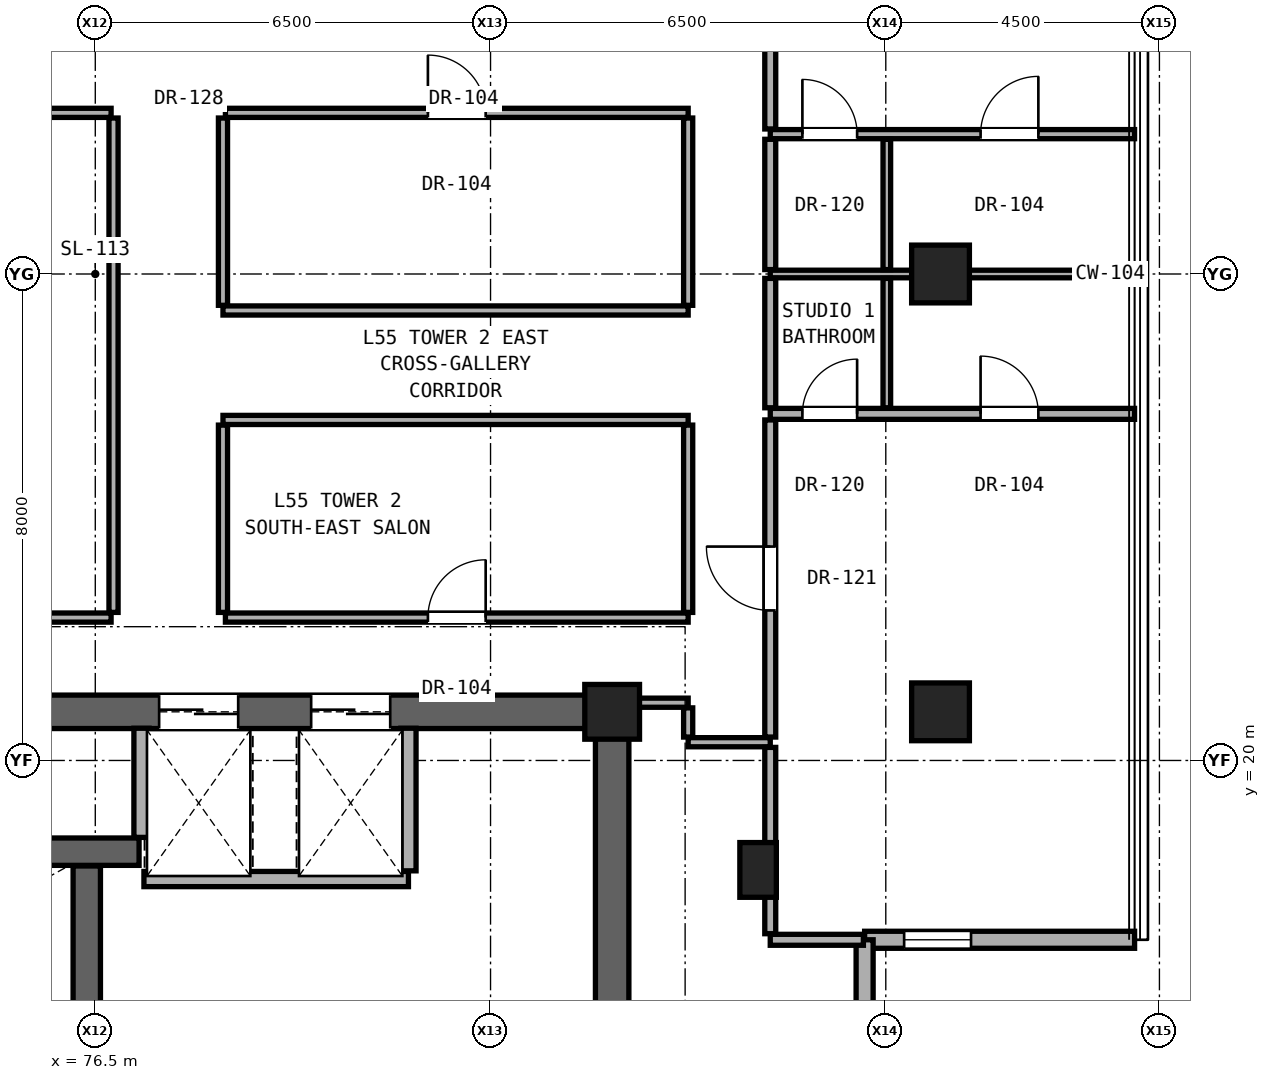
"""IFC4 building model, lengths in metres.
Left out: names, types, materials, properties, quantities, classifications, styles, units other than length and angle.
Written with IfcOpenShell. Run it as: python <this file> out.ifc"""

import sys

from ifc_helpers import new_model, si_unit, direction, frame, frame_2d, origin, origin_2d, place, context, subcontext, project, spatial, rectangle, hollow_rectangle, extrude, element, fill, save


model = new_model("IFC4")
c1 = context("Model", 3, precision=1e-05, world=origin(), true_north=direction((0.0, 1.0)))
c2 = subcontext(c1, "Body", "Model", "MODEL_VIEW")
j1 = project(units=[si_unit("LENGTHUNIT", "METRE"), si_unit("PLANEANGLEUNIT", "RADIAN")], contexts=[c1])
p1 = place(None, origin())
s1 = spatial("IfcSite", under=j1, at=p1, CompositionType="ELEMENT")
p2 = place(p1, origin())
s2 = spatial("IfcBuilding", under=s1, at=p2, CompositionType="ELEMENT")
p3 = place(p2, frame((0.0, 0.0, 193.4)))
s3 = spatial("IfcBuildingStorey", under=s2, at=p3, CompositionType="ELEMENT", Elevation=193.4)
p4 = place(p3, frame((85.0, 20.8, 0.0), z_axis=(0.0, 0.0, 1.0), x_axis=(1.0, 0.0, 0.0)))
e1 = element("IfcColumn", 1, at=p4, inside=s3, PredefinedType="COLUMN", context=c2, shape_type="SweptSolid", body=[
    extrude(rectangle(XDim=0.9, YDim=0.9, at=origin_2d()), origin(), (0.0, 0.0, 1.0), 3.25),
])
for number, where, z_axis, x_axis in (
    (2, (90.4, 20.8, 0.0), (0.0, 0.0, 1.0), (1.0, 0.0, 0.0)),
    (3, (90.4, 28.0, 0.0), (0.0, 0.0, 1.0), (1.0, 0.0, 0.0)),
):
    element("IfcColumn", number, at=place(p3, frame(where, z_axis=z_axis, x_axis=x_axis)), inside=s3, PredefinedType="COLUMN", context=c2, shape_type="SweptSolid", body=[
        extrude(hollow_rectangle(XDim=0.95, YDim=0.95, WallThickness=0.05, at=origin_2d()), origin(), (0.0, 0.0, 1.0), 3.25),
    ])
p5 = place(p3, frame((87.4, 18.2, 0.0), z_axis=(0.0, 0.0, 1.0), x_axis=(1.0, 0.0, 0.0)))
e4 = element("IfcColumn", 4, at=p5, inside=s3, PredefinedType="PILASTER", context=c2, shape_type="SweptSolid", body=[
    extrude(rectangle(XDim=0.6, YDim=0.9, at=origin_2d()), origin(), (0.0, 0.0, 1.0), 3.25),
])
p6 = place(p3, frame((85.0, 15.2, 0.0), z_axis=(0.0, 0.0, 1.0), x_axis=(0.0, 1.0, 0.0)))
e5 = element("IfcWall", 5, at=p6, inside=s3, PredefinedType="SHEAR", context=c2, shape_type="SweptSolid", body=[
    extrude(rectangle(XDim=5.6, YDim=0.55, at=frame_2d((2.8, 0.0))), origin(), (0.0, 0.0, 1.0), 3.05),
])
p7 = place(p3, frame((68.0, 20.8, 0.0), z_axis=(0.0, 0.0, 1.0), x_axis=(1.0, 0.0, 0.0)))
e6 = element("IfcWall", 6, at=p7, inside=s3, PredefinedType="SHEAR", context=c2, shape_type="SweptSolid", body=[
    extrude(rectangle(XDim=17.0, YDim=0.55, at=frame_2d((8.5, 0.0))), origin(), (0.0, 0.0, 1.0), 3.05),
])
p8 = place(p7, frame((9.55, 0.0, 0.0)))
e7 = element("IfcOpeningElement", 7, at=p8, cuts=e6, PredefinedType="OPENING", context=c2, shape_type="SweptSolid", body=[
    extrude(rectangle(XDim=1.3, YDim=2.3, at=frame_2d((0.65, 1.15))), frame((0.0, 0.285, 0.0), z_axis=(0.0, -1.0, 0.0), x_axis=(1.0, 0.0, 0.0)), (0.0, 0.0, 1.0), 0.57),
])
p9 = place(p7, frame((12.05, 0.0, 0.0)))
e8 = element("IfcOpeningElement", 8, at=p9, cuts=e6, PredefinedType="OPENING", context=c2, shape_type="SweptSolid", body=[
    extrude(rectangle(XDim=1.3, YDim=2.3, at=frame_2d((0.65, 1.15))), frame((0.0, 0.285, 0.0), z_axis=(0.0, -1.0, 0.0), x_axis=(1.0, 0.0, 0.0)), (0.0, 0.0, 1.0), 0.57),
])
p10 = place(p3, frame((89.152, 17.051, 0.0), z_axis=(0.0, 0.0, 1.0), x_axis=(1.0, 0.0, 0.0)))
e9 = element("IfcWall", 9, at=p10, inside=s3, PredefinedType="SOLIDWALL", context=c2, shape_type="SweptSolid", body=[
    extrude(rectangle(XDim=4.44, YDim=0.28, at=frame_2d((2.22, 0.0))), origin(), (0.0, 0.0, 1.0), 3.03),
])
p11 = place(p10, frame((0.65, 0.0, 0.85)))
e10 = element("IfcOpeningElement", 10, at=p11, cuts=e9, PredefinedType="OPENING", context=c2, shape_type="SweptSolid", body=[
    extrude(rectangle(XDim=1.1, YDim=2.0, at=frame_2d((0.55, 1.0))), frame((0.0, 0.15, 0.0), z_axis=(0.0, -1.0, 0.0), x_axis=(1.0, 0.0, 0.0)), (0.0, 0.0, 1.0), 0.3),
])
p12 = place(p3, frame((89.152, 12.612, 0.0), z_axis=(0.0, 0.0, 1.0), x_axis=(0.0, 1.0, 0.0)))
e11 = element("IfcWall", 11, at=p12, inside=s3, PredefinedType="SOLIDWALL", context=c2, shape_type="SweptSolid", body=[
    extrude(rectangle(XDim=4.44, YDim=0.28, at=frame_2d((2.22, 0.0))), origin(), (0.0, 0.0, 1.0), 3.03),
])
p13 = place(p3, frame((87.6, 17.051, 0.0), z_axis=(0.0, 0.0, 1.0), x_axis=(1.0, 0.0, 0.0)))
e12 = element("IfcWall", 12, at=p13, inside=s3, PredefinedType="PARTITIONING", context=c2, shape_type="SweptSolid", body=[
    extrude(rectangle(XDim=1.532, YDim=0.18, at=frame_2d((0.766, 0.0))), origin(), (0.0, 0.0, 1.0), 3.05),
])
p14 = place(p3, frame((77.3, 18.05, 0.0), z_axis=(0.0, 0.0, 1.0), x_axis=(1.0, 0.0, 0.0)))
e13 = element("IfcWall", 13, at=p14, inside=s3, PredefinedType="SOLIDWALL", context=c2, shape_type="SweptSolid", body=[
    extrude(rectangle(XDim=4.35, YDim=0.25, at=frame_2d((2.175, 0.0))), origin(), (0.0, 0.0, 1.0), 3.05),
])
p15 = place(p3, frame((68.27, 18.5, 0.0), z_axis=(0.0, 0.0, 1.0), x_axis=(1.0, 0.0, 0.0)))
e14 = element("IfcWall", 14, at=p15, inside=s3, PredefinedType="SHEAR", context=c2, shape_type="SweptSolid", body=[
    extrude(rectangle(XDim=8.95, YDim=0.45, at=frame_2d((4.475, 0.0))), origin(), (0.0, 0.0, 1.0), 3.05),
])
p16 = place(p15, frame((0.52, 0.0, 0.0)))
e15 = element("IfcOpeningElement", 15, at=p16, cuts=e14, PredefinedType="OPENING", context=c2, shape_type="SweptSolid", body=[
    extrude(rectangle(XDim=1.15, YDim=2.2, at=frame_2d((0.575, 1.1))), frame((0.0, 0.235, 0.0), z_axis=(0.0, -1.0, 0.0), x_axis=(1.0, 0.0, 0.0)), (0.0, 0.0, 1.0), 0.47),
])
p17 = place(p3, frame((86.25, 20.3, 0.0), z_axis=(0.0, 0.0, 1.0), x_axis=(1.0, 0.0, 0.0)))
e16 = element("IfcWall", 16, at=p17, inside=s3, PredefinedType="PARTITIONING", context=c2, shape_type="SweptSolid", body=[
    extrude(rectangle(XDim=1.35, YDim=0.15, at=frame_2d((0.675, 0.0))), origin(), (0.0, 0.0, 1.0), 3.05),
])
p18 = place(p3, frame((85.27, 20.95, 0.0), z_axis=(0.0, 0.0, 1.0), x_axis=(1.0, 0.0, 0.0)))
e17 = element("IfcWall", 17, at=p18, inside=s3, PredefinedType="PARTITIONING", context=c2, shape_type="SweptSolid", body=[
    extrude(rectangle(XDim=0.98, YDim=0.15, at=frame_2d((0.49, 0.0))), origin(), (0.0, 0.0, 1.0), 2.442),
])
p19 = place(p3, frame((66.62, 22.35, 0.0), z_axis=(0.0, 0.0, 1.0), x_axis=(1.0, 0.0, 0.0)))
e18 = element("IfcWall", 18, at=p19, inside=s3, PredefinedType="PARTITIONING", context=c2, shape_type="SweptSolid", body=[
    extrude(rectangle(XDim=10.14, YDim=0.15, at=frame_2d((5.07, 0.0))), origin(), (0.0, 0.0, 1.0), 2.186),
])
p20 = place(p3, frame((78.64, 22.35, 0.0), z_axis=(0.0, 0.0, 1.0), x_axis=(1.0, 0.0, 0.0)))
e19 = element("IfcWall", 19, at=p20, inside=s3, PredefinedType="PARTITIONING", context=c2, shape_type="SweptSolid", body=[
    extrude(rectangle(XDim=7.61, YDim=0.15, at=frame_2d((3.805, 0.0))), origin(), (0.0, 0.0, 1.0), 2.186),
])
p21 = place(p20, frame((3.33, 0.0, 0.0)))
e20 = element("IfcOpeningElement", 20, at=p21, cuts=e19, PredefinedType="OPENING", context=c2, shape_type="SweptSolid", body=[
    extrude(rectangle(XDim=0.95, YDim=2.15, at=frame_2d((0.475, 1.075))), frame((0.0, 0.085, 0.0), z_axis=(0.0, -1.0, 0.0), x_axis=(1.0, 0.0, 0.0)), (0.0, 0.0, 1.0), 0.17),
])
p22 = place(p3, frame((78.6, 25.6, 0.0), z_axis=(0.0, 0.0, 1.0), x_axis=(1.0, 0.0, 0.0)))
e21 = element("IfcWall", 21, at=p22, inside=s3, PredefinedType="PARTITIONING", context=c2, shape_type="SweptSolid", body=[
    extrude(rectangle(XDim=7.65, YDim=0.15, at=frame_2d((3.825, 0.0))), origin(), (0.0, 0.0, 1.0), 2.186),
])
p23 = place(p3, frame((87.6, 25.7, 0.0), z_axis=(0.0, 0.0, 1.0), x_axis=(1.0, 0.0, 0.0)))
e22 = element("IfcWall", 22, at=p23, inside=s3, PredefinedType="PARTITIONING", context=c2, shape_type="SweptSolid", body=[
    extrude(rectangle(XDim=5.991, YDim=0.18, at=frame_2d((2.996, 0.0))), origin(), (0.0, 0.0, 1.0), 2.269),
])
p24 = place(p23, frame((3.459, 0.0, 0.0)))
e23 = element("IfcOpeningElement", 23, at=p24, cuts=e22, PredefinedType="OPENING", context=c2, shape_type="SweptSolid", body=[
    extrude(rectangle(XDim=0.95, YDim=2.15, at=frame_2d((0.475, 1.075))), frame((0.0, 0.1, 0.0), z_axis=(0.0, -1.0, 0.0), x_axis=(1.0, 0.0, 0.0)), (0.0, 0.0, 1.0), 0.2),
])
p25 = place(p23, frame((0.529, 0.0, 0.0)))
e24 = element("IfcOpeningElement", 24, at=p25, cuts=e22, PredefinedType="OPENING", context=c2, shape_type="SweptSolid", body=[
    extrude(rectangle(XDim=0.9, YDim=2.1, at=frame_2d((0.45, 1.05))), frame((0.0, 0.1, 0.0), z_axis=(0.0, -1.0, 0.0), x_axis=(1.0, 0.0, 0.0)), (0.0, 0.0, 1.0), 0.2),
])
p26 = place(p3, frame((78.6, 27.4, 0.0), z_axis=(0.0, 0.0, 1.0), x_axis=(1.0, 0.0, 0.0)))
e25 = element("IfcWall", 25, at=p26, inside=s3, PredefinedType="PARTITIONING", context=c2, shape_type="SweptSolid", body=[
    extrude(rectangle(XDim=7.65, YDim=0.15, at=frame_2d((3.825, 0.0))), origin(), (0.0, 0.0, 1.0), 2.186),
])
p27 = place(p3, frame((87.6, 28.0, 0.0), z_axis=(0.0, 0.0, 1.0), x_axis=(1.0, 0.0, 0.0)))
e26 = element("IfcWall", 26, at=p27, inside=s3, PredefinedType="PARTITIONING", context=c2, shape_type="SweptSolid", body=[
    extrude(rectangle(XDim=5.991, YDim=0.125, at=frame_2d((2.996, 0.0))), origin(), (0.0, 0.0, 1.0), 2.269),
])
p28 = place(p3, frame((87.6, 30.3, 0.0), z_axis=(0.0, 0.0, 1.0), x_axis=(1.0, 0.0, 0.0)))
e27 = element("IfcWall", 27, at=p28, inside=s3, PredefinedType="PARTITIONING", context=c2, shape_type="SweptSolid", body=[
    extrude(rectangle(XDim=5.991, YDim=0.15, at=frame_2d((2.996, 0.0))), origin(), (0.0, 0.0, 1.0), 2.269),
])
p29 = place(p28, frame((3.459, 0.0, 0.0)))
e28 = element("IfcOpeningElement", 28, at=p29, cuts=e27, PredefinedType="OPENING", context=c2, shape_type="SweptSolid", body=[
    extrude(rectangle(XDim=0.95, YDim=2.15, at=frame_2d((0.475, 1.075))), frame((0.0, 0.085, 0.0), z_axis=(0.0, -1.0, 0.0), x_axis=(1.0, 0.0, 0.0)), (0.0, 0.0, 1.0), 0.17),
])
p30 = place(p28, frame((0.529, 0.0, 0.0)))
e29 = element("IfcOpeningElement", 29, at=p30, cuts=e27, PredefinedType="OPENING", context=c2, shape_type="SweptSolid", body=[
    extrude(rectangle(XDim=0.9, YDim=2.1, at=frame_2d((0.45, 1.05))), frame((0.0, 0.085, 0.0), z_axis=(0.0, -1.0, 0.0), x_axis=(1.0, 0.0, 0.0)), (0.0, 0.0, 1.0), 0.17),
])
p31 = place(p3, frame((66.62, 30.65, 0.0), z_axis=(0.0, 0.0, 1.0), x_axis=(1.0, 0.0, 0.0)))
e30 = element("IfcWall", 30, at=p31, inside=s3, PredefinedType="PARTITIONING", context=c2, shape_type="SweptSolid", body=[
    extrude(rectangle(XDim=10.14, YDim=0.15, at=frame_2d((5.07, 0.0))), origin(), (0.0, 0.0, 1.0), 2.186),
])
p32 = place(p31, frame((6.14, 0.0, 0.0)))
e31 = element("IfcOpeningElement", 31, at=p32, cuts=e30, PredefinedType="OPENING", context=c2, shape_type="SweptSolid", body=[
    extrude(rectangle(XDim=0.95, YDim=2.15, at=frame_2d((0.475, 1.075))), frame((0.0, 0.085, 0.0), z_axis=(0.0, -1.0, 0.0), x_axis=(1.0, 0.0, 0.0)), (0.0, 0.0, 1.0), 0.17),
])
p33 = place(p3, frame((78.64, 30.65, 0.0), z_axis=(0.0, 0.0, 1.0), x_axis=(1.0, 0.0, 0.0)))
e32 = element("IfcWall", 32, at=p33, inside=s3, PredefinedType="PARTITIONING", context=c2, shape_type="SweptSolid", body=[
    extrude(rectangle(XDim=7.61, YDim=0.15, at=frame_2d((3.805, 0.0))), origin(), (0.0, 0.0, 1.0), 2.186),
])
p34 = place(p33, frame((3.33, 0.0, 0.0)))
e33 = element("IfcOpeningElement", 33, at=p34, cuts=e32, PredefinedType="OPENING", context=c2, shape_type="SweptSolid", body=[
    extrude(rectangle(XDim=0.95, YDim=2.15, at=frame_2d((0.475, 1.075))), frame((0.0, 0.085, 0.0), z_axis=(0.0, -1.0, 0.0), x_axis=(1.0, 0.0, 0.0)), (0.0, 0.0, 1.0), 0.17),
])
p35 = place(p3, frame((76.36, 15.665, 0.0), z_axis=(0.0, 0.0, 1.0), x_axis=(0.0, 1.0, 0.0)))
e34 = element("IfcWall", 34, at=p35, inside=s3, PredefinedType="SHEAR", context=c2, shape_type="SweptSolid", body=[
    extrude(rectangle(XDim=2.6, YDim=0.45, at=frame_2d((1.3, 0.0))), origin(), (0.0, 0.0, 1.0), 3.05),
])
p36 = place(p3, frame((76.8, 22.435, 0.0), z_axis=(0.0, 0.0, 1.0), x_axis=(0.0, 1.0, 0.0)))
e35 = element("IfcWall", 35, at=p36, inside=s3, PredefinedType="PARTITIONING", context=c2, shape_type="SweptSolid", body=[
    extrude(rectangle(XDim=8.13, YDim=0.15, at=frame_2d((4.065, 0.0))), origin(), (0.0, 0.0, 1.0), 2.186),
])
p37 = place(p3, frame((77.26, 18.735, 0.0), z_axis=(0.0, 0.0, 1.0), x_axis=(0.0, 1.0, 0.0)))
e36 = element("IfcWall", 36, at=p37, inside=s3, PredefinedType="SOLIDWALL", context=c2, shape_type="SweptSolid", body=[
    extrude(rectangle(XDim=1.795, YDim=0.25, at=frame_2d((0.897, 0.0))), origin(), (0.0, 0.0, 1.0), 3.05),
])
p38 = place(p3, frame((78.6, 22.435, 0.0), z_axis=(0.0, 0.0, 1.0), x_axis=(0.0, 1.0, 0.0)))
e37 = element("IfcWall", 37, at=p38, inside=s3, PredefinedType="PARTITIONING", context=c2, shape_type="SweptSolid", body=[
    extrude(rectangle(XDim=3.08, YDim=0.15, at=frame_2d((1.54, 0.0))), origin(), (0.0, 0.0, 1.0), 3.05),
])
p39 = place(p3, frame((78.6, 27.485, 0.0), z_axis=(0.0, 0.0, 1.0), x_axis=(0.0, 1.0, 0.0)))
e38 = element("IfcWall", 38, at=p39, inside=s3, PredefinedType="PARTITIONING", context=c2, shape_type="SweptSolid", body=[
    extrude(rectangle(XDim=3.08, YDim=0.15, at=frame_2d((1.54, 0.0))), origin(), (0.0, 0.0, 1.0), 2.186),
])
p40 = place(p3, frame((81.65, 18.185, 0.0), z_axis=(0.0, 0.0, 1.0), x_axis=(0.0, 1.0, 0.0)))
e39 = element("IfcWall", 39, at=p40, inside=s3, PredefinedType="SOLIDWALL", context=c2, shape_type="SweptSolid", body=[
    extrude(rectangle(XDim=2.345, YDim=0.25, at=frame_2d((1.172, 0.0))), origin(), (0.0, 0.0, 1.0), 3.05),
])
p41 = place(p3, frame((86.25, 20.385, 0.0), z_axis=(0.0, 0.0, 1.0), x_axis=(0.0, 1.0, 0.0)))
e40 = element("IfcWall", 40, at=p41, inside=s3, PredefinedType="PARTITIONING", context=c2, shape_type="SweptSolid", body=[
    extrude(rectangle(XDim=0.48, YDim=0.15, at=frame_2d((0.24, 0.0))), origin(), (0.0, 0.0, 1.0), 2.442),
])
p42 = place(p3, frame((86.25, 22.435, 0.0), z_axis=(0.0, 0.0, 1.0), x_axis=(0.0, 1.0, 0.0)))
e41 = element("IfcWall", 41, at=p42, inside=s3, PredefinedType="PARTITIONING", context=c2, shape_type="SweptSolid", body=[
    extrude(rectangle(XDim=3.08, YDim=0.15, at=frame_2d((1.54, 0.0))), origin(), (0.0, 0.0, 1.0), 3.05),
])
p43 = place(p3, frame((86.25, 27.485, 0.0), z_axis=(0.0, 0.0, 1.0), x_axis=(0.0, 1.0, 0.0)))
e42 = element("IfcWall", 42, at=p43, inside=s3, PredefinedType="PARTITIONING", context=c2, shape_type="SweptSolid", body=[
    extrude(rectangle(XDim=3.08, YDim=0.15, at=frame_2d((1.54, 0.0))), origin(), (0.0, 0.0, 1.0), 2.346),
])
p44 = place(p3, frame((87.6, 17.151, 0.0), z_axis=(0.0, 0.0, 1.0), x_axis=(0.0, 1.0, 0.0)))
e43 = element("IfcWall", 43, at=p44, inside=s3, PredefinedType="PARTITIONING", context=c2, shape_type="SweptSolid", body=[
    extrude(rectangle(XDim=3.064, YDim=0.18, at=frame_2d((1.532, 0.0))), origin(), (0.0, 0.0, 1.0), 2.493),
])
p45 = place(p3, frame((87.6, 20.385, 0.0), z_axis=(0.0, 0.0, 1.0), x_axis=(0.0, 1.0, 0.0)))
e44 = element("IfcWall", 44, at=p45, inside=s3, PredefinedType="PARTITIONING", context=c2, shape_type="SweptSolid", body=[
    extrude(rectangle(XDim=5.215, YDim=0.18, at=frame_2d((2.607, 0.0))), origin(), (0.0, 0.0, 1.0), 2.442),
])
p46 = place(p45, frame((2.083, 0.0, 0.0)))
e45 = element("IfcOpeningElement", 45, at=p46, cuts=e44, PredefinedType="OPENING", context=c2, shape_type="SweptSolid", body=[
    extrude(rectangle(XDim=1.05, YDim=2.2, at=frame_2d((0.525, 1.1))), frame((0.0, 0.1, 0.0), z_axis=(0.0, -1.0, 0.0), x_axis=(1.0, 0.0, 0.0)), (0.0, 0.0, 1.0), 0.2),
])
p47 = place(p3, frame((87.6, 25.8, 0.0), z_axis=(0.0, 0.0, 1.0), x_axis=(0.0, 1.0, 0.0)))
e46 = element("IfcWall", 46, at=p47, inside=s3, PredefinedType="PARTITIONING", context=c2, shape_type="SweptSolid", body=[
    extrude(rectangle(XDim=2.127, YDim=0.18, at=frame_2d((1.064, 0.0))), origin(), (0.0, 0.0, 1.0), 2.346),
])
p48 = place(p3, frame((87.6, 28.073, 0.0), z_axis=(0.0, 0.0, 1.0), x_axis=(0.0, 1.0, 0.0)))
e47 = element("IfcWall", 47, at=p48, inside=s3, PredefinedType="PARTITIONING", context=c2, shape_type="SweptSolid", body=[
    extrude(rectangle(XDim=2.143, YDim=0.18, at=frame_2d((1.071, 0.0))), origin(), (0.0, 0.0, 1.0), 2.346),
])
p49 = place(p3, frame((87.6, 30.385, 0.0), z_axis=(0.0, 0.0, 1.0), x_axis=(0.0, 1.0, 0.0)))
e48 = element("IfcWall", 48, at=p49, inside=s3, PredefinedType="PARTITIONING", context=c2, shape_type="SweptSolid", body=[
    extrude(rectangle(XDim=5.23, YDim=0.18, at=frame_2d((2.615, 0.0))), origin(), (0.0, 0.0, 1.0), 2.442),
])
p50 = place(p49, frame((2.09, 0.0, 0.0)))
e49 = element("IfcOpeningElement", 49, at=p50, cuts=e48, PredefinedType="OPENING", context=c2, shape_type="SweptSolid", body=[
    extrude(rectangle(XDim=1.05, YDim=2.2, at=frame_2d((0.525, 1.1))), frame((0.0, 0.1, 0.0), z_axis=(0.0, -1.0, 0.0), x_axis=(1.0, 0.0, 0.0)), (0.0, 0.0, 1.0), 0.2),
])
p51 = place(p3, frame((89.517, 25.8, 0.0), z_axis=(0.0, 0.0, 1.0), x_axis=(0.0, 1.0, 0.0)))
e50 = element("IfcWall", 50, at=p51, inside=s3, PredefinedType="PARTITIONING", context=c2, shape_type="SweptSolid", body=[
    extrude(rectangle(XDim=2.127, YDim=0.125, at=frame_2d((1.064, 0.0))), origin(), (0.0, 0.0, 1.0), 2.346),
])
p52 = place(p3, frame((89.517, 28.073, 0.0), z_axis=(0.0, 0.0, 1.0), x_axis=(0.0, 1.0, 0.0)))
e51 = element("IfcWall", 51, at=p52, inside=s3, PredefinedType="PARTITIONING", context=c2, shape_type="SweptSolid", body=[
    extrude(rectangle(XDim=2.143, YDim=0.125, at=frame_2d((1.071, 0.0))), origin(), (0.0, 0.0, 1.0), 2.346),
])
p53 = place(p11, origin())
e52 = element("IfcWindow", 52, at=p53, inside=s3, PartitioningType="SINGLE_PANEL", PredefinedType="WINDOW", context=c2, shape_type="SweptSolid", body=[
    extrude(rectangle(XDim=1.1, YDim=2.0, at=frame_2d((0.55, 1.0))), frame((0.0, 0.03, 0.0), z_axis=(0.0, -1.0, 0.0), x_axis=(1.0, 0.0, 0.0)), (0.0, 0.0, 1.0), 0.06),
])
fill(e10, e52)
p54 = place(p46, origin())
e53 = element("IfcDoor", 53, at=p54, inside=s3, OperationType="SINGLE_SWING_RIGHT", PredefinedType="DOOR", context=c2, shape_type="SweptSolid", body=[
    extrude(rectangle(XDim=1.05, YDim=2.2, at=frame_2d((0.525, 1.1))), frame((0.0, 0.025, 0.0), z_axis=(0.0, -1.0, 0.0), x_axis=(1.0, 0.0, 0.0)), (0.0, 0.0, 1.0), 0.05),
])
fill(e45, e53)
p55 = place(p24, origin())
e54 = element("IfcDoor", 54, at=p55, inside=s3, OperationType="SINGLE_SWING_LEFT", PredefinedType="DOOR", context=c2, shape_type="SweptSolid", body=[
    extrude(rectangle(XDim=0.95, YDim=2.15, at=frame_2d((0.475, 1.075))), frame((0.0, 0.025, 0.0), z_axis=(0.0, -1.0, 0.0), x_axis=(1.0, 0.0, 0.0)), (0.0, 0.0, 1.0), 0.05),
])
fill(e23, e54)
p56 = place(p25, origin())
e55 = element("IfcDoor", 55, at=p56, inside=s3, OperationType="SINGLE_SWING_RIGHT", PredefinedType="DOOR", context=c2, shape_type="SweptSolid", body=[
    extrude(rectangle(XDim=0.9, YDim=2.1, at=frame_2d((0.45, 1.05))), frame((0.0, 0.025, 0.0), z_axis=(0.0, -1.0, 0.0), x_axis=(1.0, 0.0, 0.0)), (0.0, 0.0, 1.0), 0.05),
])
fill(e24, e55)
p57 = place(p29, origin())
e56 = element("IfcDoor", 56, at=p57, inside=s3, OperationType="SINGLE_SWING_RIGHT", PredefinedType="DOOR", context=c2, shape_type="SweptSolid", body=[
    extrude(rectangle(XDim=0.95, YDim=2.15, at=frame_2d((0.475, 1.075))), frame((0.0, 0.025, 0.0), z_axis=(0.0, -1.0, 0.0), x_axis=(1.0, 0.0, 0.0)), (0.0, 0.0, 1.0), 0.05),
])
fill(e28, e56)
p58 = place(p30, origin())
e57 = element("IfcDoor", 57, at=p58, inside=s3, OperationType="SINGLE_SWING_LEFT", PredefinedType="DOOR", context=c2, shape_type="SweptSolid", body=[
    extrude(rectangle(XDim=0.9, YDim=2.1, at=frame_2d((0.45, 1.05))), frame((0.0, 0.025, 0.0), z_axis=(0.0, -1.0, 0.0), x_axis=(1.0, 0.0, 0.0)), (0.0, 0.0, 1.0), 0.05),
])
fill(e29, e57)
p59 = place(p21, origin())
e58 = element("IfcDoor", 58, at=p59, inside=s3, OperationType="SINGLE_SWING_RIGHT", PredefinedType="DOOR", context=c2, shape_type="SweptSolid", body=[
    extrude(rectangle(XDim=0.95, YDim=2.15, at=frame_2d((0.475, 1.075))), frame((0.0, 0.025, 0.0), z_axis=(0.0, -1.0, 0.0), x_axis=(1.0, 0.0, 0.0)), (0.0, 0.0, 1.0), 0.05),
])
fill(e20, e58)
p60 = place(p34, origin())
e59 = element("IfcDoor", 59, at=p60, inside=s3, OperationType="SINGLE_SWING_LEFT", PredefinedType="DOOR", context=c2, shape_type="SweptSolid", body=[
    extrude(rectangle(XDim=0.95, YDim=2.15, at=frame_2d((0.475, 1.075))), frame((0.0, 0.025, 0.0), z_axis=(0.0, -1.0, 0.0), x_axis=(1.0, 0.0, 0.0)), (0.0, 0.0, 1.0), 0.05),
])
fill(e33, e59)
p61 = place(p8, origin())
e60 = element("IfcDoor", 60, at=p61, inside=s3, OperationType="DOUBLE_DOOR_SLIDING", PredefinedType="DOOR", context=c2, shape_type="SweptSolid", body=[
    extrude(rectangle(XDim=1.3, YDim=2.3, at=frame_2d((0.65, 1.15))), frame((0.0, 0.025, 0.0), z_axis=(0.0, -1.0, 0.0), x_axis=(1.0, 0.0, 0.0)), (0.0, 0.0, 1.0), 0.05),
])
fill(e7, e60)
p62 = place(p9, origin())
e61 = element("IfcDoor", 61, at=p62, inside=s3, OperationType="DOUBLE_DOOR_SLIDING", PredefinedType="DOOR", context=c2, shape_type="SweptSolid", body=[
    extrude(rectangle(XDim=1.3, YDim=2.3, at=frame_2d((0.65, 1.15))), frame((0.0, 0.025, 0.0), z_axis=(0.0, -1.0, 0.0), x_axis=(1.0, 0.0, 0.0)), (0.0, 0.0, 1.0), 0.05),
])
fill(e8, e61)
save(model, sys.argv[1])
